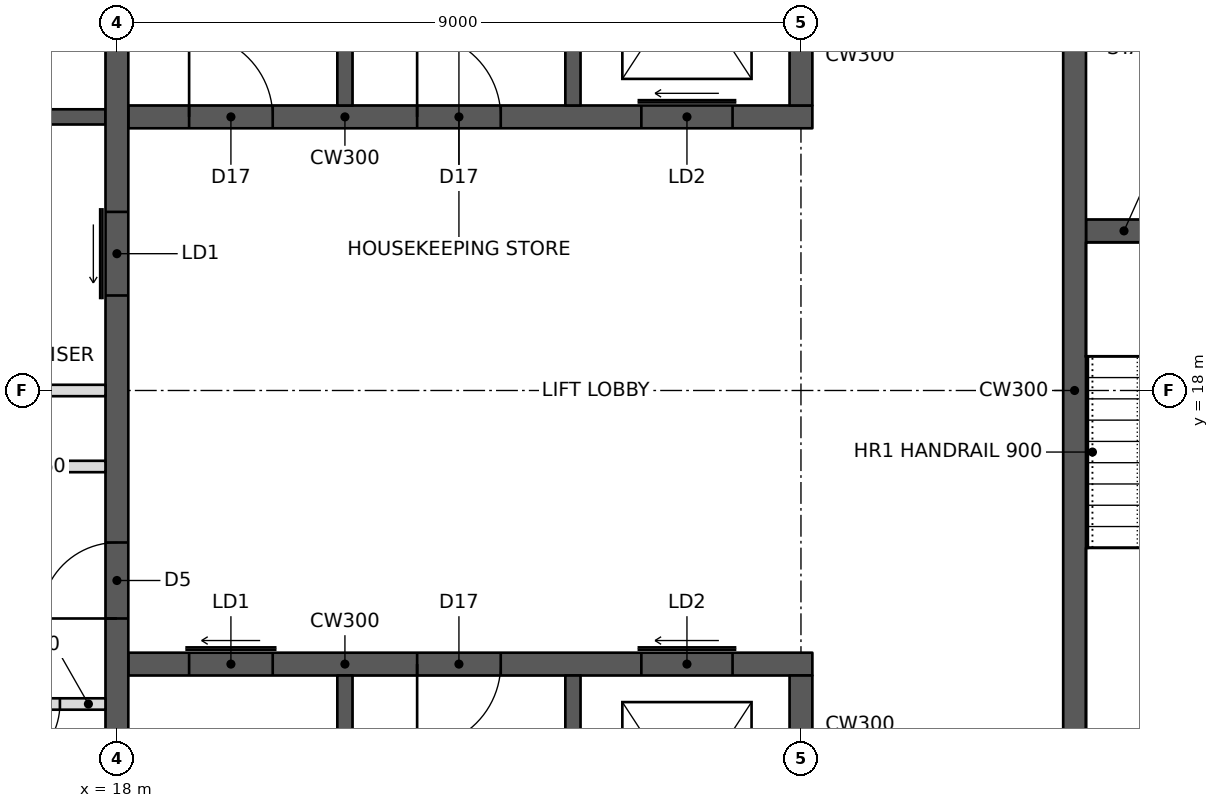
"""IFC4 building model, lengths in metres.
Left out: names, types, materials, properties, quantities, classifications, styles, units other than length and angle.
Written with IfcOpenShell. Run it as: python <this file> out.ifc"""

import sys

from ifc_helpers import new_model, si_unit, direction, frame, frame_2d, origin, place, context, subcontext, project, spatial, rectangle, extrude, element, fill, save


model = new_model("IFC4")
c1 = context("Model", 3, precision=1e-05, world=origin(), true_north=direction((0.0, 1.0)))
c2 = subcontext(c1, "Body", "Model", "MODEL_VIEW")
j1 = project(units=[si_unit("LENGTHUNIT", "METRE"), si_unit("PLANEANGLEUNIT", "RADIAN")], contexts=[c1])
p1 = place(None, origin())
s1 = spatial("IfcSite", under=j1, at=p1, CompositionType="ELEMENT")
p2 = place(p1, origin())
s2 = spatial("IfcBuilding", under=s1, at=p2, CompositionType="ELEMENT")
p3 = place(p2, frame((0.0, 0.0, 208.0)))
s3 = spatial("IfcBuildingStorey", under=s2, at=p3, CompositionType="ELEMENT", Elevation=208.0)
p4 = place(p3, frame((18.0, 11.4, 0.0), z_axis=(0.0, 0.0, 1.0), x_axis=(0.0, 1.0, 0.0)))
e1 = element("IfcWall", 1, at=p4, inside=s3, PredefinedType="SHEAR", context=c2, shape_type="SweptSolid", body=[
    extrude(rectangle(XDim=13.2, YDim=0.3, at=frame_2d((6.6, 0.0))), origin(), (0.0, 0.0, 1.0), 3.4),
])
p5 = place(p4, frame((3.6, 0.0, 0.0)))
e2 = element("IfcOpeningElement", 2, at=p5, cuts=e1, PredefinedType="OPENING", context=c2, shape_type="SweptSolid", body=[
    extrude(rectangle(XDim=1.0, YDim=2.1, at=frame_2d((0.5, 1.05))), frame((0.0, 0.16, 0.0), z_axis=(0.0, -1.0, 0.0), x_axis=(1.0, 0.0, 0.0)), (0.0, 0.0, 1.0), 0.32),
])
p6 = place(p4, frame((7.85, 0.0, 0.0)))
e3 = element("IfcOpeningElement", 3, at=p6, cuts=e1, PredefinedType="OPENING", context=c2, shape_type="SweptSolid", body=[
    extrude(rectangle(XDim=1.1, YDim=2.1, at=frame_2d((0.55, 1.05))), frame((0.0, 0.16, 0.0), z_axis=(0.0, -1.0, 0.0), x_axis=(1.0, 0.0, 0.0)), (0.0, 0.0, 1.0), 0.32),
])
p7 = place(p3, frame((14.55, 18.0, 0.0), z_axis=(0.0, 0.0, 1.0), x_axis=(1.0, 0.0, 0.0)))
e4 = element("IfcWall", 4, at=p7, inside=s3, PredefinedType="PARTITIONING", context=c2, shape_type="SweptSolid", body=[
    extrude(rectangle(XDim=3.3, YDim=0.15, at=frame_2d((1.65, 0.0))), origin(), (0.0, 0.0, 1.0), 3.2),
])
p8 = place(p3, frame((18.15, 14.4, 0.0), z_axis=(0.0, 0.0, 1.0), x_axis=(1.0, 0.0, 0.0)))
e5 = element("IfcWall", 5, at=p8, inside=s3, PredefinedType="SHEAR", context=c2, shape_type="SweptSolid", body=[
    extrude(rectangle(XDim=9.0, YDim=0.3, at=frame_2d((4.5, 0.0))), origin(), (0.0, 0.0, 1.0), 3.4),
])
p9 = place(p8, frame((0.8, 0.0, 0.0)))
e6 = element("IfcOpeningElement", 6, at=p9, cuts=e5, PredefinedType="OPENING", context=c2, shape_type="SweptSolid", body=[
    extrude(rectangle(XDim=1.1, YDim=2.1, at=frame_2d((0.55, 1.05))), frame((0.0, 0.16, 0.0), z_axis=(0.0, -1.0, 0.0), x_axis=(1.0, 0.0, 0.0)), (0.0, 0.0, 1.0), 0.32),
])
p10 = place(p8, frame((6.75, 0.0, 0.0)))
e7 = element("IfcOpeningElement", 7, at=p10, cuts=e5, PredefinedType="OPENING", context=c2, shape_type="SweptSolid", body=[
    extrude(rectangle(XDim=1.2, YDim=2.1, at=frame_2d((0.6, 1.05))), frame((0.0, 0.16, 0.0), z_axis=(0.0, -1.0, 0.0), x_axis=(1.0, 0.0, 0.0)), (0.0, 0.0, 1.0), 0.32),
])
p11 = place(p8, frame((3.8, 0.0, 0.0)))
e8 = element("IfcOpeningElement", 8, at=p11, cuts=e5, PredefinedType="OPENING", context=c2, shape_type="SweptSolid", body=[
    extrude(rectangle(XDim=1.1, YDim=2.1, at=frame_2d((0.55, 1.05))), frame((0.0, 0.16, 0.0), z_axis=(0.0, -1.0, 0.0), x_axis=(1.0, 0.0, 0.0)), (0.0, 0.0, 1.0), 0.32),
])
p12 = place(p3, frame((27.0, 11.4, 0.0), z_axis=(0.0, 0.0, 1.0), x_axis=(0.0, 1.0, 0.0)))
e9 = element("IfcWall", 9, at=p12, inside=s3, PredefinedType="SHEAR", context=c2, shape_type="SweptSolid", body=[
    extrude(rectangle(XDim=2.85, YDim=0.3, at=frame_2d((1.425, 0.0))), origin(), (0.0, 0.0, 1.0), 3.4),
])
for number, where, z_axis, x_axis in (
    (10, (21.0, 11.4, 0.0), (0.0, 0.0, 1.0), (0.0, 1.0, 0.0)),
    (11, (24.0, 11.4, 0.0), (0.0, 0.0, 1.0), (0.0, 1.0, 0.0)),
):
    element("IfcWall", number, at=place(p3, frame(where, z_axis=z_axis, x_axis=x_axis)), inside=s3, PredefinedType="SHEAR", context=c2, shape_type="SweptSolid", body=[
        extrude(rectangle(XDim=2.85, YDim=0.2, at=frame_2d((1.425, 0.0))), origin(), (0.0, 0.0, 1.0), 3.4),
    ])
p13 = place(p3, frame((18.15, 21.6, 0.0), z_axis=(0.0, 0.0, 1.0), x_axis=(1.0, 0.0, 0.0)))
e12 = element("IfcWall", 12, at=p13, inside=s3, PredefinedType="SHEAR", context=c2, shape_type="SweptSolid", body=[
    extrude(rectangle(XDim=9.0, YDim=0.3, at=frame_2d((4.5, 0.0))), origin(), (0.0, 0.0, 1.0), 3.4),
])
p14 = place(p13, frame((6.75, 0.0, 0.0)))
e13 = element("IfcOpeningElement", 13, at=p14, cuts=e12, PredefinedType="OPENING", context=c2, shape_type="SweptSolid", body=[
    extrude(rectangle(XDim=1.2, YDim=2.1, at=frame_2d((0.6, 1.05))), frame((0.0, 0.16, 0.0), z_axis=(0.0, -1.0, 0.0), x_axis=(1.0, 0.0, 0.0)), (0.0, 0.0, 1.0), 0.32),
])
p15 = place(p13, frame((0.8, 0.0, 0.0)))
e14 = element("IfcOpeningElement", 14, at=p15, cuts=e12, PredefinedType="OPENING", context=c2, shape_type="SweptSolid", body=[
    extrude(rectangle(XDim=1.1, YDim=2.1, at=frame_2d((0.55, 1.05))), frame((0.0, 0.16, 0.0), z_axis=(0.0, -1.0, 0.0), x_axis=(1.0, 0.0, 0.0)), (0.0, 0.0, 1.0), 0.32),
])
p16 = place(p13, frame((3.8, 0.0, 0.0)))
e15 = element("IfcOpeningElement", 15, at=p16, cuts=e12, PredefinedType="OPENING", context=c2, shape_type="SweptSolid", body=[
    extrude(rectangle(XDim=1.1, YDim=2.1, at=frame_2d((0.55, 1.05))), frame((0.0, 0.16, 0.0), z_axis=(0.0, -1.0, 0.0), x_axis=(1.0, 0.0, 0.0)), (0.0, 0.0, 1.0), 0.32),
])
p17 = place(p3, frame((27.0, 21.75, 0.0), z_axis=(0.0, 0.0, 1.0), x_axis=(0.0, 1.0, 0.0)))
e16 = element("IfcWall", 16, at=p17, inside=s3, PredefinedType="SHEAR", context=c2, shape_type="SweptSolid", body=[
    extrude(rectangle(XDim=2.85, YDim=0.3, at=frame_2d((1.425, 0.0))), origin(), (0.0, 0.0, 1.0), 3.4),
])
for number, where, z_axis, x_axis in (
    (17, (21.0, 21.75, 0.0), (0.0, 0.0, 1.0), (0.0, 1.0, 0.0)),
    (18, (24.0, 21.75, 0.0), (0.0, 0.0, 1.0), (0.0, 1.0, 0.0)),
):
    element("IfcWall", number, at=place(p3, frame(where, z_axis=z_axis, x_axis=x_axis)), inside=s3, PredefinedType="SHEAR", context=c2, shape_type="SweptSolid", body=[
        extrude(rectangle(XDim=2.85, YDim=0.2, at=frame_2d((1.425, 0.0))), origin(), (0.0, 0.0, 1.0), 3.4),
    ])
p18 = place(p3, frame((30.6, 11.4, 0.0), z_axis=(0.0, 0.0, 1.0), x_axis=(0.0, 1.0, 0.0)))
e19 = element("IfcWall", 19, at=p18, inside=s3, PredefinedType="SHEAR", context=c2, shape_type="SweptSolid", body=[
    extrude(rectangle(XDim=13.2, YDim=0.3, at=frame_2d((6.6, 0.0))), origin(), (0.0, 0.0, 1.0), 3.4),
])
p19 = place(p3, frame((30.75, 20.1, 0.0), z_axis=(0.0, 0.0, 1.0), x_axis=(1.0, 0.0, 0.0)))
e20 = element("IfcWall", 20, at=p19, inside=s3, PredefinedType="SHEAR", context=c2, shape_type="SweptSolid", body=[
    extrude(rectangle(XDim=2.85, YDim=0.3, at=frame_2d((1.425, 0.0))), origin(), (0.0, 0.0, 1.0), 3.4),
])
p20 = place(p19, frame((1.15, 0.0, 0.0)))
e21 = element("IfcOpeningElement", 21, at=p20, cuts=e20, PredefinedType="OPENING", context=c2, shape_type="SweptSolid", body=[
    extrude(rectangle(XDim=1.0, YDim=2.1, at=frame_2d((0.5, 1.05))), frame((0.0, 0.16, 0.0), z_axis=(0.0, -1.0, 0.0), x_axis=(1.0, 0.0, 0.0)), (0.0, 0.0, 1.0), 0.32),
])
p21 = place(p3, frame((14.55, 21.6, 0.0), z_axis=(0.0, 0.0, 1.0), x_axis=(1.0, 0.0, 0.0)))
e22 = element("IfcWall", 22, at=p21, inside=s3, PredefinedType="SHEAR", context=c2, shape_type="SweptSolid", body=[
    extrude(rectangle(XDim=3.3, YDim=0.2, at=frame_2d((1.65, 0.0))), origin(), (0.0, 0.0, 1.0), 3.4),
])
p22 = place(p3, frame((14.55, 17.0, 0.0), z_axis=(0.0, 0.0, 1.0), x_axis=(1.0, 0.0, 0.0)))
e23 = element("IfcWall", 23, at=p22, inside=s3, PredefinedType="PARTITIONING", context=c2, shape_type="SweptSolid", body=[
    extrude(rectangle(XDim=3.3, YDim=0.15, at=frame_2d((1.65, 0.0))), origin(), (0.0, 0.0, 1.0), 3.2),
])
p23 = place(p22, frame((0.3, 0.0, 0.0)))
e24 = element("IfcOpeningElement", 24, at=p23, cuts=e23, PredefinedType="OPENING", context=c2, shape_type="SweptSolid", body=[
    extrude(rectangle(XDim=1.0, YDim=2.1, at=frame_2d((0.5, 1.05))), frame((0.0, 0.085, 0.0), z_axis=(0.0, -1.0, 0.0), x_axis=(1.0, 0.0, 0.0)), (0.0, 0.0, 1.0), 0.17),
])
p24 = place(p3, frame((14.55, 13.875, 0.0), z_axis=(0.0, 0.0, 1.0), x_axis=(1.0, 0.0, 0.0)))
e25 = element("IfcWall", 25, at=p24, inside=s3, PredefinedType="PARTITIONING", context=c2, shape_type="SweptSolid", body=[
    extrude(rectangle(XDim=3.3, YDim=0.15, at=frame_2d((1.65, 0.0))), origin(), (0.0, 0.0, 1.0), 3.2),
])
p25 = place(p24, frame((0.2, 0.0, 0.0)))
e26 = element("IfcOpeningElement", 26, at=p25, cuts=e25, PredefinedType="OPENING", context=c2, shape_type="SweptSolid", body=[
    extrude(rectangle(XDim=0.9, YDim=2.1, at=frame_2d((0.45, 1.05))), frame((0.0, 0.085, 0.0), z_axis=(0.0, -1.0, 0.0), x_axis=(1.0, 0.0, 0.0)), (0.0, 0.0, 1.0), 0.17),
])
p26 = place(p24, frame((1.8, 0.0, 0.0)))
e27 = element("IfcOpeningElement", 27, at=p26, cuts=e25, PredefinedType="OPENING", context=c2, shape_type="SweptSolid", body=[
    extrude(rectangle(XDim=0.9, YDim=2.1, at=frame_2d((0.45, 1.05))), frame((0.0, 0.085, 0.0), z_axis=(0.0, -1.0, 0.0), x_axis=(1.0, 0.0, 0.0)), (0.0, 0.0, 1.0), 0.17),
])
p27 = place(p26, frame((0.9, 0.0, 0.0), z_axis=(0.0, 0.0, 1.0), x_axis=(-1.0, 0.0, 0.0)))
e28 = element("IfcDoor", 28, at=p27, inside=s3, OperationType="SINGLE_SWING_RIGHT", PredefinedType="DOOR", context=c2, shape_type="SweptSolid", body=[
    extrude(rectangle(XDim=0.9, YDim=2.1, at=frame_2d((0.45, 1.05))), frame((0.0, 0.025, 0.0), z_axis=(0.0, -1.0, 0.0), x_axis=(1.0, 0.0, 0.0)), (0.0, 0.0, 1.0), 0.05),
])
fill(e27, e28)
p28 = place(p5, origin())
e29 = element("IfcDoor", 29, at=p28, inside=s3, OperationType="SINGLE_SWING_LEFT", PredefinedType="DOOR", context=c2, shape_type="SweptSolid", body=[
    extrude(rectangle(XDim=1.0, YDim=2.1, at=frame_2d((0.5, 1.05))), frame((0.0, 0.025, 0.0), z_axis=(0.0, -1.0, 0.0), x_axis=(1.0, 0.0, 0.0)), (0.0, 0.0, 1.0), 0.05),
])
fill(e2, e29)
p29 = place(p9, origin())
e30 = element("IfcDoor", 30, at=p29, inside=s3, OperationType="SLIDING_TO_LEFT", PredefinedType="DOOR", context=c2, shape_type="SweptSolid", body=[
    extrude(rectangle(XDim=1.1, YDim=2.1, at=frame_2d((0.55, 1.05))), frame((0.0, 0.025, 0.0), z_axis=(0.0, -1.0, 0.0), x_axis=(1.0, 0.0, 0.0)), (0.0, 0.0, 1.0), 0.05),
])
fill(e6, e30)
p30 = place(p6, origin())
e31 = element("IfcDoor", 31, at=p30, inside=s3, OperationType="SLIDING_TO_LEFT", PredefinedType="DOOR", context=c2, shape_type="SweptSolid", body=[
    extrude(rectangle(XDim=1.1, YDim=2.1, at=frame_2d((0.55, 1.05))), frame((0.0, 0.025, 0.0), z_axis=(0.0, -1.0, 0.0), x_axis=(1.0, 0.0, 0.0)), (0.0, 0.0, 1.0), 0.05),
])
fill(e3, e31)
p31 = place(p10, origin())
e32 = element("IfcDoor", 32, at=p31, inside=s3, OperationType="SLIDING_TO_LEFT", PredefinedType="DOOR", context=c2, shape_type="SweptSolid", body=[
    extrude(rectangle(XDim=1.2, YDim=2.1, at=frame_2d((0.6, 1.05))), frame((0.0, 0.025, 0.0), z_axis=(0.0, -1.0, 0.0), x_axis=(1.0, 0.0, 0.0)), (0.0, 0.0, 1.0), 0.05),
])
fill(e7, e32)
p32 = place(p14, origin())
e33 = element("IfcDoor", 33, at=p32, inside=s3, OperationType="SLIDING_TO_LEFT", PredefinedType="DOOR", context=c2, shape_type="SweptSolid", body=[
    extrude(rectangle(XDim=1.2, YDim=2.1, at=frame_2d((0.6, 1.05))), frame((0.0, 0.025, 0.0), z_axis=(0.0, -1.0, 0.0), x_axis=(1.0, 0.0, 0.0)), (0.0, 0.0, 1.0), 0.05),
])
fill(e13, e33)
p33 = place(p15, origin())
e34 = element("IfcDoor", 34, at=p33, inside=s3, OperationType="SINGLE_SWING_LEFT", PredefinedType="DOOR", context=c2, shape_type="SweptSolid", body=[
    extrude(rectangle(XDim=1.1, YDim=2.1, at=frame_2d((0.55, 1.05))), frame((0.0, 0.025, 0.0), z_axis=(0.0, -1.0, 0.0), x_axis=(1.0, 0.0, 0.0)), (0.0, 0.0, 1.0), 0.05),
])
fill(e14, e34)
p34 = place(p16, origin())
e35 = element("IfcDoor", 35, at=p34, inside=s3, OperationType="SINGLE_SWING_LEFT", PredefinedType="DOOR", context=c2, shape_type="SweptSolid", body=[
    extrude(rectangle(XDim=1.1, YDim=2.1, at=frame_2d((0.55, 1.05))), frame((0.0, 0.025, 0.0), z_axis=(0.0, -1.0, 0.0), x_axis=(1.0, 0.0, 0.0)), (0.0, 0.0, 1.0), 0.05),
])
fill(e15, e35)
p35 = place(p11, frame((1.1, 0.0, 0.0), z_axis=(0.0, 0.0, 1.0), x_axis=(-1.0, 0.0, 0.0)))
e36 = element("IfcDoor", 36, at=p35, inside=s3, OperationType="SINGLE_SWING_RIGHT", PredefinedType="DOOR", context=c2, shape_type="SweptSolid", body=[
    extrude(rectangle(XDim=1.1, YDim=2.1, at=frame_2d((0.55, 1.05))), frame((0.0, 0.025, 0.0), z_axis=(0.0, -1.0, 0.0), x_axis=(1.0, 0.0, 0.0)), (0.0, 0.0, 1.0), 0.05),
])
fill(e8, e36)
save(model, sys.argv[1])
